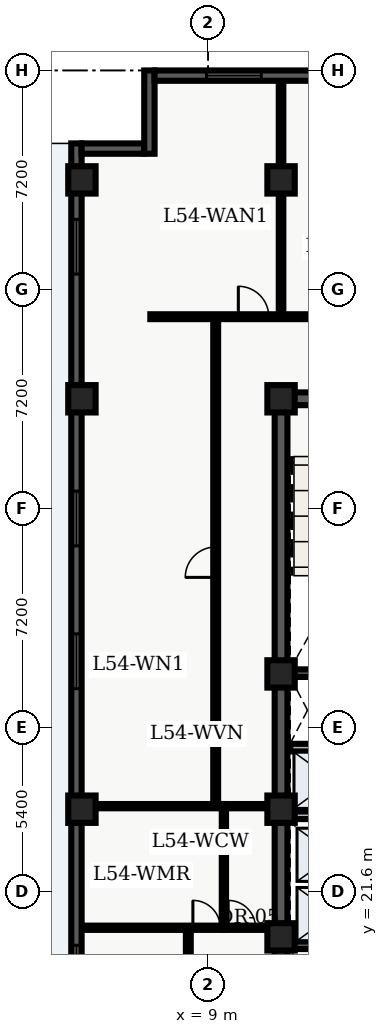
"""IFC4 building model, lengths in metres.
Left out: names, types, materials, properties, quantities, classifications, styles, units other than length and angle.
Written with IfcOpenShell. Run it as: python <this file> out.ifc"""

import sys

from ifc_helpers import new_model, entity, si_unit, converted_unit, direction, frame, origin_with_axes, origin_2d_with_axis, place, context, subcontext, project, spatial, polyline, rectangle, outline, extrude, element, fill, save


model = new_model("IFC4")
c1 = context("Model", 3, precision=1e-05, world=origin_with_axes(), true_north=direction((0.0, 1.0)))
c2 = subcontext(c1, "Body", "Model", "MODEL_VIEW")
j1 = project(units=[si_unit("LENGTHUNIT", "METRE"), converted_unit("PLANEANGLEUNIT", "DEGREE", entity("IfcPlaneAngleMeasure", 0.017), si_unit("PLANEANGLEUNIT", "RADIAN"), dimensions=[0, 0, 0, 0, 0, 0, 0])], contexts=[c1])
p1 = place(None, origin_with_axes())
s1 = spatial("IfcSite", under=j1, at=p1, CompositionType="ELEMENT")
p2 = place(p1, origin_with_axes())
s2 = spatial("IfcBuilding", under=s1, at=p2, CompositionType="ELEMENT")
p3 = place(p2, frame((0.0, 0.0, 219.9), z_axis=(0.0, 0.0, 1.0), x_axis=(1.0, 0.0, 0.0)))
s3 = spatial("IfcBuildingStorey", under=s2, at=p3, CompositionType="ELEMENT", Elevation=219.9)
p4 = place(p3, frame((11.4, 10.8, 0.0), z_axis=(0.0, 0.0, 1.0), x_axis=(0.0, 1.0, 0.0)))
e1 = element("IfcWall", 1, at=p4, inside=s3, PredefinedType="SHEAR", context=c2, shape_type="SweptSolid", body=[
    extrude(outline(polyline([(0.0, -0.21), (27.0, -0.21), (27.0, 0.21), (0.0, 0.21), (0.0, -0.21)])), origin_with_axes(), (0.0, 0.0, 1.0), 4.56),
])
p5 = place(p3, frame((11.4, 37.8, 0.0), z_axis=(0.0, 0.0, 1.0), x_axis=(1.0, 0.0, 0.0)))
e2 = element("IfcWall", 2, at=p5, inside=s3, PredefinedType="SHEAR", context=c2, shape_type="SweptSolid", body=[
    extrude(outline(polyline([(0.0, -0.21), (7.2, -0.21), (7.2, 0.21), (0.0, 0.21), (0.0, -0.21)])), origin_with_axes(), (0.0, 0.0, 1.0), 4.56),
])
p6 = place(p5, frame((2.625, 0.0, 0.0), z_axis=(0.0, 0.0, 1.0), x_axis=(1.0, 0.0, 0.0)))
e3 = element("IfcOpeningElement", 3, at=p6, cuts=e2, PredefinedType="OPENING", context=c2, shape_type="SweptSolid", body=[
    extrude(rectangle(XDim=1.05, YDim=0.44, at=origin_2d_with_axis()), origin_with_axes(), (0.0, 0.0, 1.0), 2.15),
])
for number, where, z_axis, x_axis in (
    (4, (11.61, 19.825, 0.0), (0.0, 0.0, 1.0), (1.0, 0.0, 0.0)),
    (5, (11.61, 28.775, 0.0), (0.0, 0.0, 1.0), (1.0, 0.0, 0.0)),
):
    element("IfcWall", number, at=place(p3, frame(where, z_axis=z_axis, x_axis=x_axis)), inside=s3, PredefinedType="SHEAR", context=c2, shape_type="SweptSolid", body=[
        extrude(outline(polyline([(0.0, -0.125), (6.78, -0.125), (6.78, 0.125), (0.0, 0.125), (0.0, -0.125)])), origin_with_axes(), (0.0, 0.0, 1.0), 4.56),
    ])
p7 = place(p3, frame((11.7, 24.1, 0.0), z_axis=(0.0, 0.0, 1.0), x_axis=(1.0, 0.0, 0.0)))
e6 = element("IfcWall", 6, at=p7, inside=s3, PredefinedType="SOLIDWALL", context=c2, shape_type="SweptSolid", body=[
    extrude(outline(polyline([(0.0, -0.125), (6.6, -0.125), (6.6, 0.125), (0.0, 0.125), (0.0, -0.125)])), origin_with_axes(), (0.0, 0.0, 1.0), 3.6),
])
p8 = place(p7, frame((3.75, 0.0, 0.0), z_axis=(0.0, 0.0, 1.0), x_axis=(1.0, 0.0, 0.0)))
e7 = element("IfcOpeningElement", 7, at=p8, cuts=e6, PredefinedType="OPENING", context=c2, shape_type="SweptSolid", body=[
    extrude(rectangle(XDim=0.9, YDim=0.27, at=origin_2d_with_axis()), origin_with_axes(), (0.0, 0.0, 1.0), 2.15),
])
p9 = place(p3, frame((11.7, 26.325, 0.0), z_axis=(0.0, 0.0, 1.0), x_axis=(1.0, 0.0, 0.0)))
e8 = element("IfcWall", 8, at=p9, inside=s3, PredefinedType="SOLIDWALL", context=c2, shape_type="SweptSolid", body=[
    extrude(outline(polyline([(0.0, -0.125), (6.6, -0.125), (6.6, 0.125), (0.0, 0.125), (0.0, -0.125)])), origin_with_axes(), (0.0, 0.0, 1.0), 3.6),
])
p10 = place(p9, frame((3.5, 0.0, 0.0), z_axis=(0.0, 0.0, 1.0), x_axis=(1.0, 0.0, 0.0)))
e9 = element("IfcOpeningElement", 9, at=p10, cuts=e8, PredefinedType="OPENING", context=c2, shape_type="SweptSolid", body=[
    extrude(rectangle(XDim=0.9, YDim=0.27, at=origin_2d_with_axis()), origin_with_axes(), (0.0, 0.0, 1.0), 2.15),
])
for number, where, z_axis, x_axis in (
    (10, (11.4, 20.1, 0.0), (0.0, 0.0, 1.0), (1.0, 0.0, 0.0)),
    (11, (11.4, 24.3, 0.0), (0.0, 0.0, 1.0), (1.0, 0.0, 0.0)),
    (12, (11.4, 28.75, 0.0), (0.0, 0.0, 1.0), (1.0, 0.0, 0.0)),
    (13, (11.4, 37.8, 0.0), (0.0, 0.0, 1.0), (1.0, 0.0, 0.0)),
    (14, (11.4, 45.0, 0.0), (0.0, 0.0, 1.0), (1.0, 0.0, 0.0)),
    (15, (4.85, 24.3, 0.0), (0.0, 0.0, 1.0), (1.0, 0.0, 0.0)),
    (16, (4.85, 37.8, 0.0), (0.0, 0.0, 1.0), (1.0, 0.0, 0.0)),
    (17, (4.85, 45.0, 0.0), (0.0, 0.0, 1.0), (1.0, 0.0, 0.0)),
):
    element("IfcColumn", number, at=place(p3, frame(where, z_axis=z_axis, x_axis=x_axis)), inside=s3, PredefinedType="COLUMN", context=c2, shape_type="SweptSolid", body=[
        extrude(rectangle(XDim=0.9, YDim=0.9, at=origin_2d_with_axis()), origin_with_axes(), (0.0, 0.0, 1.0), 4.8),
    ])
p11 = place(p3, frame((9.52, 20.4, 0.0), z_axis=(0.0, 0.0, 1.0), x_axis=(0.0, 1.0, 0.0)))
e18 = element("IfcWall", 18, at=p11, inside=s3, PredefinedType="PARTITIONING", context=c2, shape_type="SweptSolid", body=[
    extrude(outline(polyline([(0.0, -0.07), (4.0, -0.07), (4.0, 0.07), (0.0, 0.07), (0.0, -0.07)])), origin_with_axes(), (0.0, 0.0, 1.0), 3.2),
])
p12 = place(p3, frame((9.52, 20.4, 0.0), z_axis=(0.0, 0.0, 1.0), x_axis=(1.0, 0.0, 0.0)))
e19 = element("IfcWall", 19, at=p12, inside=s3, PredefinedType="PARTITIONING", context=c2, shape_type="SweptSolid", body=[
    extrude(outline(polyline([(0.0, -0.07), (1.58, -0.07), (1.58, 0.07), (0.0, 0.07), (0.0, -0.07)])), origin_with_axes(), (0.0, 0.0, 1.0), 3.2),
])
p13 = place(p12, frame((0.59, 0.0, 0.0), z_axis=(0.0, 0.0, 1.0), x_axis=(1.0, 0.0, 0.0)))
e20 = element("IfcOpeningElement", 20, at=p13, cuts=e19, PredefinedType="OPENING", context=c2, shape_type="SweptSolid", body=[
    extrude(rectangle(XDim=0.9, YDim=0.16, at=origin_2d_with_axis()), origin_with_axes(), (0.0, 0.0, 1.0), 2.15),
])
p14 = place(p3, frame((9.52, 24.4, 0.0), z_axis=(0.0, 0.0, 1.0), x_axis=(1.0, 0.0, 0.0)))
e21 = element("IfcWall", 21, at=p14, inside=s3, PredefinedType="PARTITIONING", context=c2, shape_type="SweptSolid", body=[
    extrude(outline(polyline([(0.0, -0.07), (1.58, -0.07), (1.58, 0.07), (0.0, 0.07), (0.0, -0.07)])), origin_with_axes(), (0.0, 0.0, 1.0), 3.2),
])
p15 = place(p3, frame((7.1, 40.5, 0.0), z_axis=(0.0, 0.0, 1.0), x_axis=(1.0, 0.0, 0.0)))
e22 = element("IfcWall", 22, at=p15, inside=s3, PredefinedType="PARTITIONING", context=c2, shape_type="SweptSolid", body=[
    extrude(outline(polyline([(0.0, -0.08), (24.965, -0.08), (24.965, 0.08), (0.0, 0.08), (0.0, -0.08)])), origin_with_axes(), (0.0, 0.0, 1.0), 3.2),
])
p16 = place(p15, frame((3.395, 0.0, 0.0), z_axis=(0.0, 0.0, 1.0), x_axis=(1.0, 0.0, 0.0)))
e23 = element("IfcOpeningElement", 23, at=p16, cuts=e22, PredefinedType="OPENING", context=c2, shape_type="SweptSolid", body=[
    extrude(rectangle(XDim=1.0, YDim=0.18, at=origin_2d_with_axis()), origin_with_axes(), (0.0, 0.0, 1.0), 2.15),
])
p17 = place(p15, frame((8.66, 0.0, 0.0), z_axis=(0.0, 0.0, 1.0), x_axis=(1.0, 0.0, 0.0)))
e24 = element("IfcOpeningElement", 24, at=p17, cuts=e22, PredefinedType="OPENING", context=c2, shape_type="SweptSolid", body=[
    extrude(rectangle(XDim=1.0, YDim=0.18, at=origin_2d_with_axis()), origin_with_axes(), (0.0, 0.0, 1.0), 2.15),
])
p18 = place(p3, frame((8.35, 7.8, 0.0), z_axis=(0.0, 0.0, 1.0), x_axis=(0.0, 1.0, 0.0)))
e25 = element("IfcWall", 25, at=p18, inside=s3, PredefinedType="PARTITIONING", context=c2, shape_type="SweptSolid", body=[
    extrude(outline(polyline([(0.0, -0.08), (12.6, -0.08), (12.6, 0.08), (0.0, 0.08), (0.0, -0.08)])), origin_with_axes(), (0.0, 0.0, 1.0), 3.2),
])
p19 = place(p18, frame((6.325, 0.0, 0.0), z_axis=(0.0, 0.0, 1.0), x_axis=(1.0, 0.0, 0.0)))
e26 = element("IfcOpeningElement", 26, at=p19, cuts=e25, PredefinedType="OPENING", context=c2, shape_type="SweptSolid", body=[
    extrude(rectangle(XDim=1.0, YDim=0.18, at=origin_2d_with_axis()), origin_with_axes(), (0.0, 0.0, 1.0), 2.15),
])
p20 = place(p3, frame((9.25, 24.4, 0.0), z_axis=(0.0, 0.0, 1.0), x_axis=(0.0, 1.0, 0.0)))
e27 = element("IfcWall", 27, at=p20, inside=s3, PredefinedType="PARTITIONING", context=c2, shape_type="SweptSolid", body=[
    extrude(outline(polyline([(0.0, -0.08), (16.1, -0.08), (16.1, 0.08), (0.0, 0.08), (0.0, -0.08)])), origin_with_axes(), (0.0, 0.0, 1.0), 3.2),
])
p21 = place(p20, frame((8.025, 0.0, 0.0), z_axis=(0.0, 0.0, 1.0), x_axis=(1.0, 0.0, 0.0)))
e28 = element("IfcOpeningElement", 28, at=p21, cuts=e27, PredefinedType="OPENING", context=c2, shape_type="SweptSolid", body=[
    extrude(rectangle(XDim=1.0, YDim=0.18, at=origin_2d_with_axis()), origin_with_axes(), (0.0, 0.0, 1.0), 2.15),
])
p22 = place(p3, frame((4.835, 20.4, 0.0), z_axis=(0.0, 0.0, 1.0), x_axis=(1.0, 0.0, 0.0)))
e29 = element("IfcWall", 29, at=p22, inside=s3, PredefinedType="PARTITIONING", context=c2, shape_type="SweptSolid", body=[
    extrude(outline(polyline([(0.0, -0.07), (4.685, -0.07), (4.685, 0.07), (0.0, 0.07), (0.0, -0.07)])), origin_with_axes(), (0.0, 0.0, 1.0), 3.2),
])
p23 = place(p22, frame((4.115, 0.0, 0.0), z_axis=(0.0, 0.0, 1.0), x_axis=(1.0, 0.0, 0.0)))
e30 = element("IfcOpeningElement", 30, at=p23, cuts=e29, PredefinedType="OPENING", context=c2, shape_type="SweptSolid", body=[
    extrude(rectangle(XDim=0.9, YDim=0.16, at=origin_2d_with_axis()), origin_with_axes(), (0.0, 0.0, 1.0), 2.15),
])
p24 = place(p3, frame((4.835, 24.4, 0.0), z_axis=(0.0, 0.0, 1.0), x_axis=(1.0, 0.0, 0.0)))
e31 = element("IfcWall", 31, at=p24, inside=s3, PredefinedType="PARTITIONING", context=c2, shape_type="SweptSolid", body=[
    extrude(outline(polyline([(0.0, -0.07), (4.685, -0.07), (4.685, 0.07), (0.0, 0.07), (0.0, -0.07)])), origin_with_axes(), (0.0, 0.0, 1.0), 3.2),
])
p25 = place(p3, frame((11.4, 40.6, 0.0), z_axis=(0.0, 0.0, 1.0), x_axis=(0.0, 1.0, 0.0)))
e32 = element("IfcWall", 32, at=p25, inside=s3, PredefinedType="PARTITIONING", context=c2, shape_type="SweptSolid", body=[
    extrude(outline(polyline([(0.0, -0.075), (7.665, -0.075), (7.665, 0.075), (0.0, 0.075), (0.0, -0.075)])), origin_with_axes(), (0.0, 0.0, 1.0), 3.2),
])
p26 = place(p3, frame((4.67, 2.74, 0.0), z_axis=(0.0, 0.0, 1.0), x_axis=(0.0, 1.0, 0.0)))
e33 = element("IfcWall", 33, at=p26, inside=s3, PredefinedType="SOLIDWALL", context=c2, shape_type="SweptSolid", body=[
    extrude(outline(polyline([(0.0, -0.17), (43.46, -0.17), (43.46, 0.17), (0.0, 0.17), (0.0, -0.17)])), origin_with_axes(), (0.0, 0.0, 1.0), 4.56),
])
p27 = place(p26, frame((2.948, 0.0, 0.45), z_axis=(0.0, 0.0, 1.0), x_axis=(1.0, 0.0, 0.0)))
e34 = element("IfcOpeningElement", 34, at=p27, cuts=e33, PredefinedType="OPENING", context=c2, shape_type="SweptSolid", body=[
    extrude(rectangle(XDim=1.8, YDim=0.36, at=origin_2d_with_axis()), origin_with_axes(), (0.0, 0.0, 1.0), 2.1),
])
p28 = place(p26, frame((12.339, 0.0, 0.45), z_axis=(0.0, 0.0, 1.0), x_axis=(1.0, 0.0, 0.0)))
e35 = element("IfcOpeningElement", 35, at=p28, cuts=e33, PredefinedType="OPENING", context=c2, shape_type="SweptSolid", body=[
    extrude(rectangle(XDim=1.8, YDim=0.36, at=origin_2d_with_axis()), origin_with_axes(), (0.0, 0.0, 1.0), 2.1),
])
p29 = place(p26, frame((16.184, 0.0, 0.45), z_axis=(0.0, 0.0, 1.0), x_axis=(1.0, 0.0, 0.0)))
e36 = element("IfcOpeningElement", 36, at=p29, cuts=e33, PredefinedType="OPENING", context=c2, shape_type="SweptSolid", body=[
    extrude(rectangle(XDim=1.8, YDim=0.36, at=origin_2d_with_axis()), origin_with_axes(), (0.0, 0.0, 1.0), 2.1),
])
p30 = place(p26, frame((26.426, 0.0, 0.45), z_axis=(0.0, 0.0, 1.0), x_axis=(1.0, 0.0, 0.0)))
e37 = element("IfcOpeningElement", 37, at=p30, cuts=e33, PredefinedType="OPENING", context=c2, shape_type="SweptSolid", body=[
    extrude(rectangle(XDim=1.8, YDim=0.36, at=origin_2d_with_axis()), origin_with_axes(), (0.0, 0.0, 1.0), 2.1),
])
p31 = place(p26, frame((31.121, 0.0, 0.45), z_axis=(0.0, 0.0, 1.0), x_axis=(1.0, 0.0, 0.0)))
e38 = element("IfcOpeningElement", 38, at=p31, cuts=e33, PredefinedType="OPENING", context=c2, shape_type="SweptSolid", body=[
    extrude(rectangle(XDim=1.8, YDim=0.36, at=origin_2d_with_axis()), origin_with_axes(), (0.0, 0.0, 1.0), 2.1),
])
p32 = place(p26, frame((40.062, 0.0, 0.45), z_axis=(0.0, 0.0, 1.0), x_axis=(1.0, 0.0, 0.0)))
e39 = element("IfcOpeningElement", 39, at=p32, cuts=e33, PredefinedType="OPENING", context=c2, shape_type="SweptSolid", body=[
    extrude(rectangle(XDim=1.8, YDim=0.36, at=origin_2d_with_axis()), origin_with_axes(), (0.0, 0.0, 1.0), 2.1),
])
p33 = place(p3, frame((4.84, 46.03, 0.0), z_axis=(0.0, 0.0, 1.0), x_axis=(1.0, 0.0, 0.0)))
e40 = element("IfcWall", 40, at=p33, inside=s3, PredefinedType="SOLIDWALL", context=c2, shape_type="SweptSolid", body=[
    extrude(outline(polyline([(0.0, -0.17), (2.06, -0.17), (2.06, 0.17), (0.0, 0.17), (0.0, -0.17)])), origin_with_axes(), (0.0, 0.0, 1.0), 4.56),
])
p34 = place(p3, frame((7.07, 45.86, 0.0), z_axis=(0.0, 0.0, 1.0), x_axis=(0.0, 1.0, 0.0)))
e41 = element("IfcWall", 41, at=p34, inside=s3, PredefinedType="SOLIDWALL", context=c2, shape_type="SweptSolid", body=[
    extrude(outline(polyline([(0.0, -0.17), (2.74, -0.17), (2.74, 0.17), (0.0, 0.17), (0.0, -0.17)])), origin_with_axes(), (0.0, 0.0, 1.0), 4.56),
])
p35 = place(p3, frame((7.24, 48.43, 0.0), z_axis=(0.0, 0.0, 1.0), x_axis=(1.0, 0.0, 0.0)))
e42 = element("IfcWall", 42, at=p35, inside=s3, PredefinedType="SOLIDWALL", context=c2, shape_type="SweptSolid", body=[
    extrude(outline(polyline([(0.0, -0.17), (18.36, -0.17), (18.36, 0.17), (0.0, 0.17), (0.0, -0.17)])), origin_with_axes(), (0.0, 0.0, 1.0), 4.56),
])
p36 = place(p35, frame((2.61, 0.0, 0.45), z_axis=(0.0, 0.0, 1.0), x_axis=(1.0, 0.0, 0.0)))
e43 = element("IfcOpeningElement", 43, at=p36, cuts=e42, PredefinedType="OPENING", context=c2, shape_type="SweptSolid", body=[
    extrude(rectangle(XDim=1.8, YDim=0.36, at=origin_2d_with_axis()), origin_with_axes(), (0.0, 0.0, 1.0), 2.1),
])
p37 = place(p35, frame((9.18, 0.0, 0.45), z_axis=(0.0, 0.0, 1.0), x_axis=(1.0, 0.0, 0.0)))
e44 = element("IfcOpeningElement", 44, at=p37, cuts=e42, PredefinedType="OPENING", context=c2, shape_type="SweptSolid", body=[
    extrude(rectangle(XDim=1.8, YDim=0.36, at=origin_2d_with_axis()), origin_with_axes(), (0.0, 0.0, 1.0), 2.1),
])
p38 = place(p35, frame((14.9, 0.0, 0.45), z_axis=(0.0, 0.0, 1.0), x_axis=(1.0, 0.0, 0.0)))
e45 = element("IfcOpeningElement", 45, at=p38, cuts=e42, PredefinedType="OPENING", context=c2, shape_type="SweptSolid", body=[
    extrude(rectangle(XDim=1.8, YDim=0.36, at=origin_2d_with_axis()), origin_with_axes(), (0.0, 0.0, 1.0), 2.1),
])
p39 = place(p12, frame((0.59, 0.0, 0.0), z_axis=(0.0, 0.0, 1.0), x_axis=(1.0, 0.0, 0.0)))
e46 = element("IfcDoor", 46, at=p39, inside=s3, OperationType="SINGLE_SWING_LEFT", PredefinedType="DOOR", context=c2, shape_type="SweptSolid", body=[
    extrude(rectangle(XDim=0.9, YDim=0.084, at=origin_2d_with_axis()), origin_with_axes(), (0.0, 0.0, 1.0), 2.15),
])
fill(e20, e46)
p40 = place(p22, frame((4.115, 0.0, 0.0), z_axis=(0.0, 0.0, 1.0), x_axis=(1.0, 0.0, 0.0)))
e47 = element("IfcDoor", 47, at=p40, inside=s3, OperationType="SINGLE_SWING_LEFT", PredefinedType="DOOR", context=c2, shape_type="SweptSolid", body=[
    extrude(rectangle(XDim=0.9, YDim=0.084, at=origin_2d_with_axis()), origin_with_axes(), (0.0, 0.0, 1.0), 2.15),
])
fill(e30, e47)
p41 = place(p20, frame((8.025, 0.0, 0.0), z_axis=(0.0, 0.0, 1.0), x_axis=(1.0, 0.0, 0.0)))
e48 = element("IfcDoor", 48, at=p41, inside=s3, OperationType="SINGLE_SWING_LEFT", PredefinedType="DOOR", context=c2, shape_type="SweptSolid", body=[
    extrude(rectangle(XDim=1.0, YDim=0.09, at=origin_2d_with_axis()), origin_with_axes(), (0.0, 0.0, 1.0), 2.15),
])
fill(e28, e48)
p42 = place(p15, frame((3.395, 0.0, 0.0), z_axis=(0.0, 0.0, 1.0), x_axis=(1.0, 0.0, 0.0)))
e49 = element("IfcDoor", 49, at=p42, inside=s3, OperationType="SINGLE_SWING_LEFT", PredefinedType="DOOR", context=c2, shape_type="SweptSolid", body=[
    extrude(rectangle(XDim=1.0, YDim=0.09, at=origin_2d_with_axis()), origin_with_axes(), (0.0, 0.0, 1.0), 2.15),
])
fill(e23, e49)
p43 = place(p26, frame((16.184, 0.0, 0.45), z_axis=(0.0, 0.0, 1.0), x_axis=(1.0, 0.0, 0.0)))
e50 = element("IfcWindow", 50, at=p43, inside=s3, PredefinedType="WINDOW", context=c2, shape_type="SweptSolid", body=[
    extrude(rectangle(XDim=1.8, YDim=0.09, at=origin_2d_with_axis()), origin_with_axes(), (0.0, 0.0, 1.0), 2.1),
])
fill(e36, e50)
p44 = place(p26, frame((26.426, 0.0, 0.45), z_axis=(0.0, 0.0, 1.0), x_axis=(1.0, 0.0, 0.0)))
e51 = element("IfcWindow", 51, at=p44, inside=s3, PredefinedType="WINDOW", context=c2, shape_type="SweptSolid", body=[
    extrude(rectangle(XDim=1.8, YDim=0.09, at=origin_2d_with_axis()), origin_with_axes(), (0.0, 0.0, 1.0), 2.1),
])
fill(e37, e51)
p45 = place(p26, frame((31.121, 0.0, 0.45), z_axis=(0.0, 0.0, 1.0), x_axis=(1.0, 0.0, 0.0)))
e52 = element("IfcWindow", 52, at=p45, inside=s3, PredefinedType="WINDOW", context=c2, shape_type="SweptSolid", body=[
    extrude(rectangle(XDim=1.8, YDim=0.09, at=origin_2d_with_axis()), origin_with_axes(), (0.0, 0.0, 1.0), 2.1),
])
fill(e38, e52)
p46 = place(p26, frame((40.062, 0.0, 0.45), z_axis=(0.0, 0.0, 1.0), x_axis=(1.0, 0.0, 0.0)))
e53 = element("IfcWindow", 53, at=p46, inside=s3, PredefinedType="WINDOW", context=c2, shape_type="SweptSolid", body=[
    extrude(rectangle(XDim=1.8, YDim=0.09, at=origin_2d_with_axis()), origin_with_axes(), (0.0, 0.0, 1.0), 2.1),
])
fill(e39, e53)
p47 = place(p35, frame((2.61, 0.0, 0.45), z_axis=(0.0, 0.0, 1.0), x_axis=(1.0, 0.0, 0.0)))
e54 = element("IfcWindow", 54, at=p47, inside=s3, PredefinedType="WINDOW", context=c2, shape_type="SweptSolid", body=[
    extrude(rectangle(XDim=1.8, YDim=0.09, at=origin_2d_with_axis()), origin_with_axes(), (0.0, 0.0, 1.0), 2.1),
])
fill(e43, e54)
save(model, sys.argv[1])
